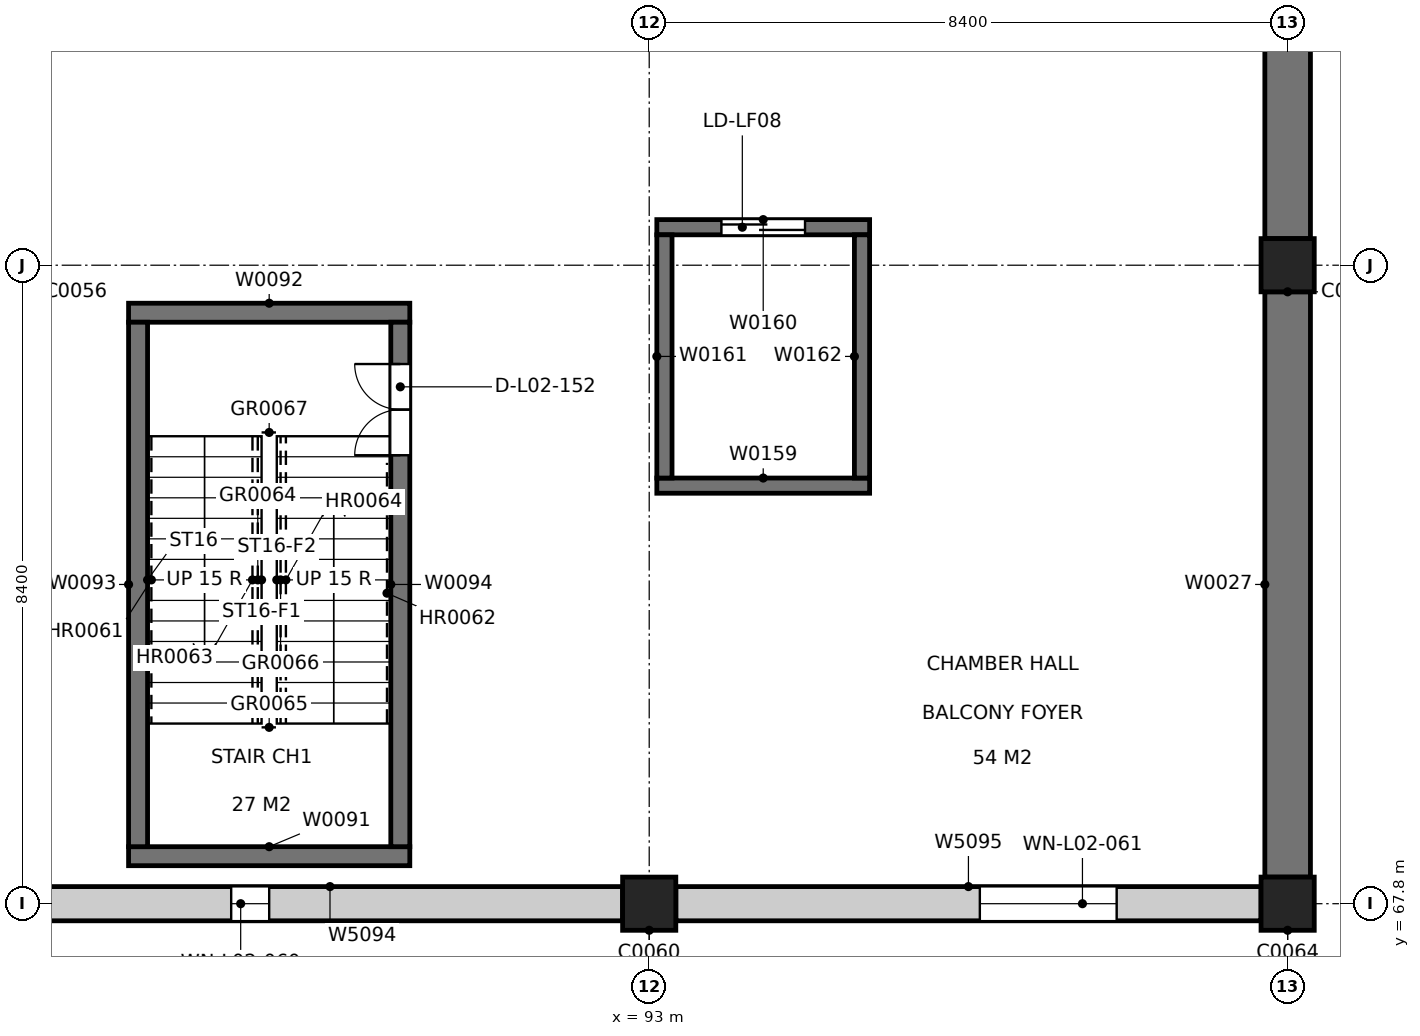
"""IFC4 building model, lengths in metres.
Left out: names, types, materials, properties, quantities, classifications, styles, units other than length and angle.
Written with IfcOpenShell. Run it as: python <this file> out.ifc"""

import sys

from ifc_helpers import new_model, si_unit, direction, frame, frame_2d, origin, origin_2d, place, context, subcontext, project, spatial, rectangle, extrude, element, fill, save


model = new_model("IFC4")
c1 = context("Model", 3, precision=1e-05, world=origin(), true_north=direction((0.0, 1.0)))
c2 = subcontext(c1, "Body", "Model", "MODEL_VIEW")
j1 = project(units=[si_unit("LENGTHUNIT", "METRE"), si_unit("PLANEANGLEUNIT", "RADIAN")], contexts=[c1])
p1 = place(None, origin())
s1 = spatial("IfcSite", under=j1, at=p1, CompositionType="ELEMENT")
p2 = place(p1, origin())
s2 = spatial("IfcBuilding", under=s1, at=p2, CompositionType="ELEMENT")
p3 = place(p2, frame((0.0, 0.0, 9.6)))
s3 = spatial("IfcBuildingStorey", under=s2, at=p3, CompositionType="ELEMENT", Elevation=9.6)
for number, where, z_axis, x_axis in (
    (1, (93.0, 67.8, 0.0), (0.0, 0.0, 1.0), (1.0, 0.0, 0.0)),
    (2, (101.4, 67.8, 0.0), (0.0, 0.0, 1.0), (1.0, 0.0, 0.0)),
    (3, (101.4, 76.2, 0.0), (0.0, 0.0, 1.0), (1.0, 0.0, 0.0)),
):
    element("IfcColumn", number, at=place(p3, frame(where, z_axis=z_axis, x_axis=x_axis)), inside=s3, PredefinedType="COLUMN", context=c2, shape_type="SweptSolid", body=[
        extrude(rectangle(XDim=0.7, YDim=0.7, at=origin_2d()), origin(), (0.0, 0.0, 1.0), 4.8),
    ])
p4 = place(p3, frame((101.4, 68.15, 0.0), z_axis=(0.0, 0.0, 1.0), x_axis=(0.0, 1.0, 0.0)))
e4 = element("IfcWall", 4, at=p4, inside=s3, PredefinedType="SOLIDWALL", context=c2, shape_type="SweptSolid", body=[
    extrude(rectangle(XDim=7.7, YDim=0.6, at=frame_2d((3.85, 0.0))), origin(), (0.0, 0.0, 1.0), 4.8),
])
p5 = place(p3, frame((101.4, 76.55, 0.0), z_axis=(0.0, 0.0, 1.0), x_axis=(0.0, 1.0, 0.0)))
e5 = element("IfcWall", 5, at=p5, inside=s3, PredefinedType="SOLIDWALL", context=c2, shape_type="SweptSolid", body=[
    extrude(rectangle(XDim=7.7, YDim=0.6, at=frame_2d((3.85, 0.0))), origin(), (0.0, 0.0, 1.0), 4.8),
])
for number, where, z_axis, x_axis in (
    (6, (86.15, 68.425, 0.0), (0.0, 0.0, 1.0), (1.0, 0.0, 0.0)),
    (7, (86.15, 75.575, 0.0), (0.0, 0.0, 1.0), (1.0, 0.0, 0.0)),
):
    element("IfcWall", number, at=place(p3, frame(where, z_axis=z_axis, x_axis=x_axis)), inside=s3, PredefinedType="SOLIDWALL", context=c2, shape_type="SweptSolid", body=[
        extrude(rectangle(XDim=3.7, YDim=0.25, at=frame_2d((1.85, 0.0))), origin(), (0.0, 0.0, 1.0), 4.8),
    ])
p6 = place(p3, frame((86.275, 68.55, 0.0), z_axis=(0.0, 0.0, 1.0), x_axis=(0.0, 1.0, 0.0)))
e8 = element("IfcWall", 8, at=p6, inside=s3, PredefinedType="SOLIDWALL", context=c2, shape_type="SweptSolid", body=[
    extrude(rectangle(XDim=6.9, YDim=0.25, at=frame_2d((3.45, 0.0))), origin(), (0.0, 0.0, 1.0), 4.8),
])
p7 = place(p3, frame((89.725, 68.55, 0.0), z_axis=(0.0, 0.0, 1.0), x_axis=(0.0, 1.0, 0.0)))
e9 = element("IfcWall", 9, at=p7, inside=s3, PredefinedType="SOLIDWALL", context=c2, shape_type="SweptSolid", body=[
    extrude(rectangle(XDim=6.9, YDim=0.25, at=frame_2d((3.45, 0.0))), origin(), (0.0, 0.0, 1.0), 4.8),
])
p8 = place(p7, frame((5.15, 0.0, 0.0)))
e10 = element("IfcOpeningElement", 10, at=p8, cuts=e9, PredefinedType="OPENING", context=c2, shape_type="SweptSolid", body=[
    extrude(rectangle(XDim=1.2, YDim=2.1, at=frame_2d((0.6, 1.05))), frame((0.0, 0.135, 0.0), z_axis=(0.0, -1.0, 0.0), x_axis=(1.0, 0.0, 0.0)), (0.0, 0.0, 1.0), 0.27),
])
p9 = place(p3, frame((93.1, 73.3, 0.0), z_axis=(0.0, 0.0, 1.0), x_axis=(1.0, 0.0, 0.0)))
e11 = element("IfcWall", 11, at=p9, inside=s3, PredefinedType="SOLIDWALL", context=c2, shape_type="SweptSolid", body=[
    extrude(rectangle(XDim=2.8, YDim=0.2, at=frame_2d((1.4, 0.0))), origin(), (0.0, 0.0, 1.0), 4.8),
])
p10 = place(p3, frame((93.1, 76.7, 0.0), z_axis=(0.0, 0.0, 1.0), x_axis=(1.0, 0.0, 0.0)))
e12 = element("IfcWall", 12, at=p10, inside=s3, PredefinedType="SOLIDWALL", context=c2, shape_type="SweptSolid", body=[
    extrude(rectangle(XDim=2.8, YDim=0.2, at=frame_2d((1.4, 0.0))), origin(), (0.0, 0.0, 1.0), 4.8),
])
p11 = place(p10, frame((0.85, 0.0, 0.0)))
e13 = element("IfcOpeningElement", 13, at=p11, cuts=e12, PredefinedType="OPENING", context=c2, shape_type="SweptSolid", body=[
    extrude(rectangle(XDim=1.1, YDim=2.1, at=frame_2d((0.55, 1.05))), frame((0.0, 0.11, 0.0), z_axis=(0.0, -1.0, 0.0), x_axis=(1.0, 0.0, 0.0)), (0.0, 0.0, 1.0), 0.22),
])
for number, where, z_axis, x_axis in (
    (14, (93.2, 73.4, 0.0), (0.0, 0.0, 1.0), (0.0, 1.0, 0.0)),
    (15, (95.8, 73.4, 0.0), (0.0, 0.0, 1.0), (0.0, 1.0, 0.0)),
):
    element("IfcWall", number, at=place(p3, frame(where, z_axis=z_axis, x_axis=x_axis)), inside=s3, PredefinedType="SOLIDWALL", context=c2, shape_type="SweptSolid", body=[
        extrude(rectangle(XDim=3.2, YDim=0.2, at=frame_2d((1.6, 0.0))), origin(), (0.0, 0.0, 1.0), 4.8),
    ])
p12 = place(p3, frame((84.95, 67.8, 0.0), z_axis=(0.0, 0.0, 1.0), x_axis=(1.0, 0.0, 0.0)))
e16 = element("IfcWall", 16, at=p12, inside=s3, PredefinedType="SOLIDWALL", context=c2, shape_type="SweptSolid", body=[
    extrude(rectangle(XDim=7.7, YDim=0.45, at=frame_2d((3.85, 0.0))), origin(), (0.0, 0.0, 1.0), 3.8),
])
p13 = place(p12, frame((2.55, 0.0, 0.9)))
e17 = element("IfcOpeningElement", 17, at=p13, cuts=e16, PredefinedType="OPENING", context=c2, shape_type="SweptSolid", body=[
    extrude(rectangle(XDim=0.5, YDim=2.1, at=frame_2d((0.25, 1.05))), frame((0.0, 0.235, 0.0), z_axis=(0.0, -1.0, 0.0), x_axis=(1.0, 0.0, 0.0)), (0.0, 0.0, 1.0), 0.47),
])
p14 = place(p3, frame((93.35, 67.8, 0.0), z_axis=(0.0, 0.0, 1.0), x_axis=(1.0, 0.0, 0.0)))
e18 = element("IfcWall", 18, at=p14, inside=s3, PredefinedType="SOLIDWALL", context=c2, shape_type="SweptSolid", body=[
    extrude(rectangle(XDim=7.7, YDim=0.45, at=frame_2d((3.85, 0.0))), origin(), (0.0, 0.0, 1.0), 3.8),
])
p15 = place(p14, frame((4.0, 0.0, 0.6)))
e19 = element("IfcOpeningElement", 19, at=p15, cuts=e18, PredefinedType="OPENING", context=c2, shape_type="SweptSolid", body=[
    extrude(rectangle(XDim=1.8, YDim=3.0, at=frame_2d((0.9, 1.5))), frame((0.0, 0.235, 0.0), z_axis=(0.0, -1.0, 0.0), x_axis=(1.0, 0.0, 0.0)), (0.0, 0.0, 1.0), 0.47),
])
p16 = place(p8, origin())
e20 = element("IfcDoor", 20, at=p16, inside=s3, OperationType="DOUBLE_DOOR_SINGLE_SWING", PredefinedType="DOOR", context=c2, shape_type="SweptSolid", body=[
    extrude(rectangle(XDim=1.2, YDim=2.1, at=frame_2d((0.6, 1.05))), frame((0.0, 0.025, 0.0), z_axis=(0.0, -1.0, 0.0), x_axis=(1.0, 0.0, 0.0)), (0.0, 0.0, 1.0), 0.05),
])
fill(e10, e20)
p17 = place(p13, origin())
e21 = element("IfcWindow", 21, at=p17, inside=s3, PartitioningType="SINGLE_PANEL", PredefinedType="WINDOW", context=c2, shape_type="SweptSolid", body=[
    extrude(rectangle(XDim=0.5, YDim=2.1, at=frame_2d((0.25, 1.05))), frame((0.0, 0.085, 0.0), z_axis=(0.0, -1.0, 0.0), x_axis=(1.0, 0.0, 0.0)), (0.0, 0.0, 1.0), 0.06),
])
fill(e17, e21)
p18 = place(p15, origin())
e22 = element("IfcWindow", 22, at=p18, inside=s3, PartitioningType="DOUBLE_PANEL_VERTICAL", PredefinedType="WINDOW", context=c2, shape_type="SweptSolid", body=[
    extrude(rectangle(XDim=1.8, YDim=3.0, at=frame_2d((0.9, 1.5))), frame((0.0, 0.135, 0.0), z_axis=(0.0, -1.0, 0.0), x_axis=(1.0, 0.0, 0.0)), (0.0, 0.0, 1.0), 0.06),
])
fill(e19, e22)
p19 = place(p11, origin())
e23 = element("IfcDoor", 23, at=p19, inside=s3, OperationType="SLIDING_TO_LEFT", PredefinedType="DOOR", context=c2, shape_type="SweptSolid", body=[
    extrude(rectangle(XDim=1.1, YDim=2.1, at=frame_2d((0.55, 1.05))), frame((0.0, 0.025, 0.0), z_axis=(0.0, -1.0, 0.0), x_axis=(1.0, 0.0, 0.0)), (0.0, 0.0, 1.0), 0.05),
])
fill(e13, e23)
save(model, sys.argv[1])
